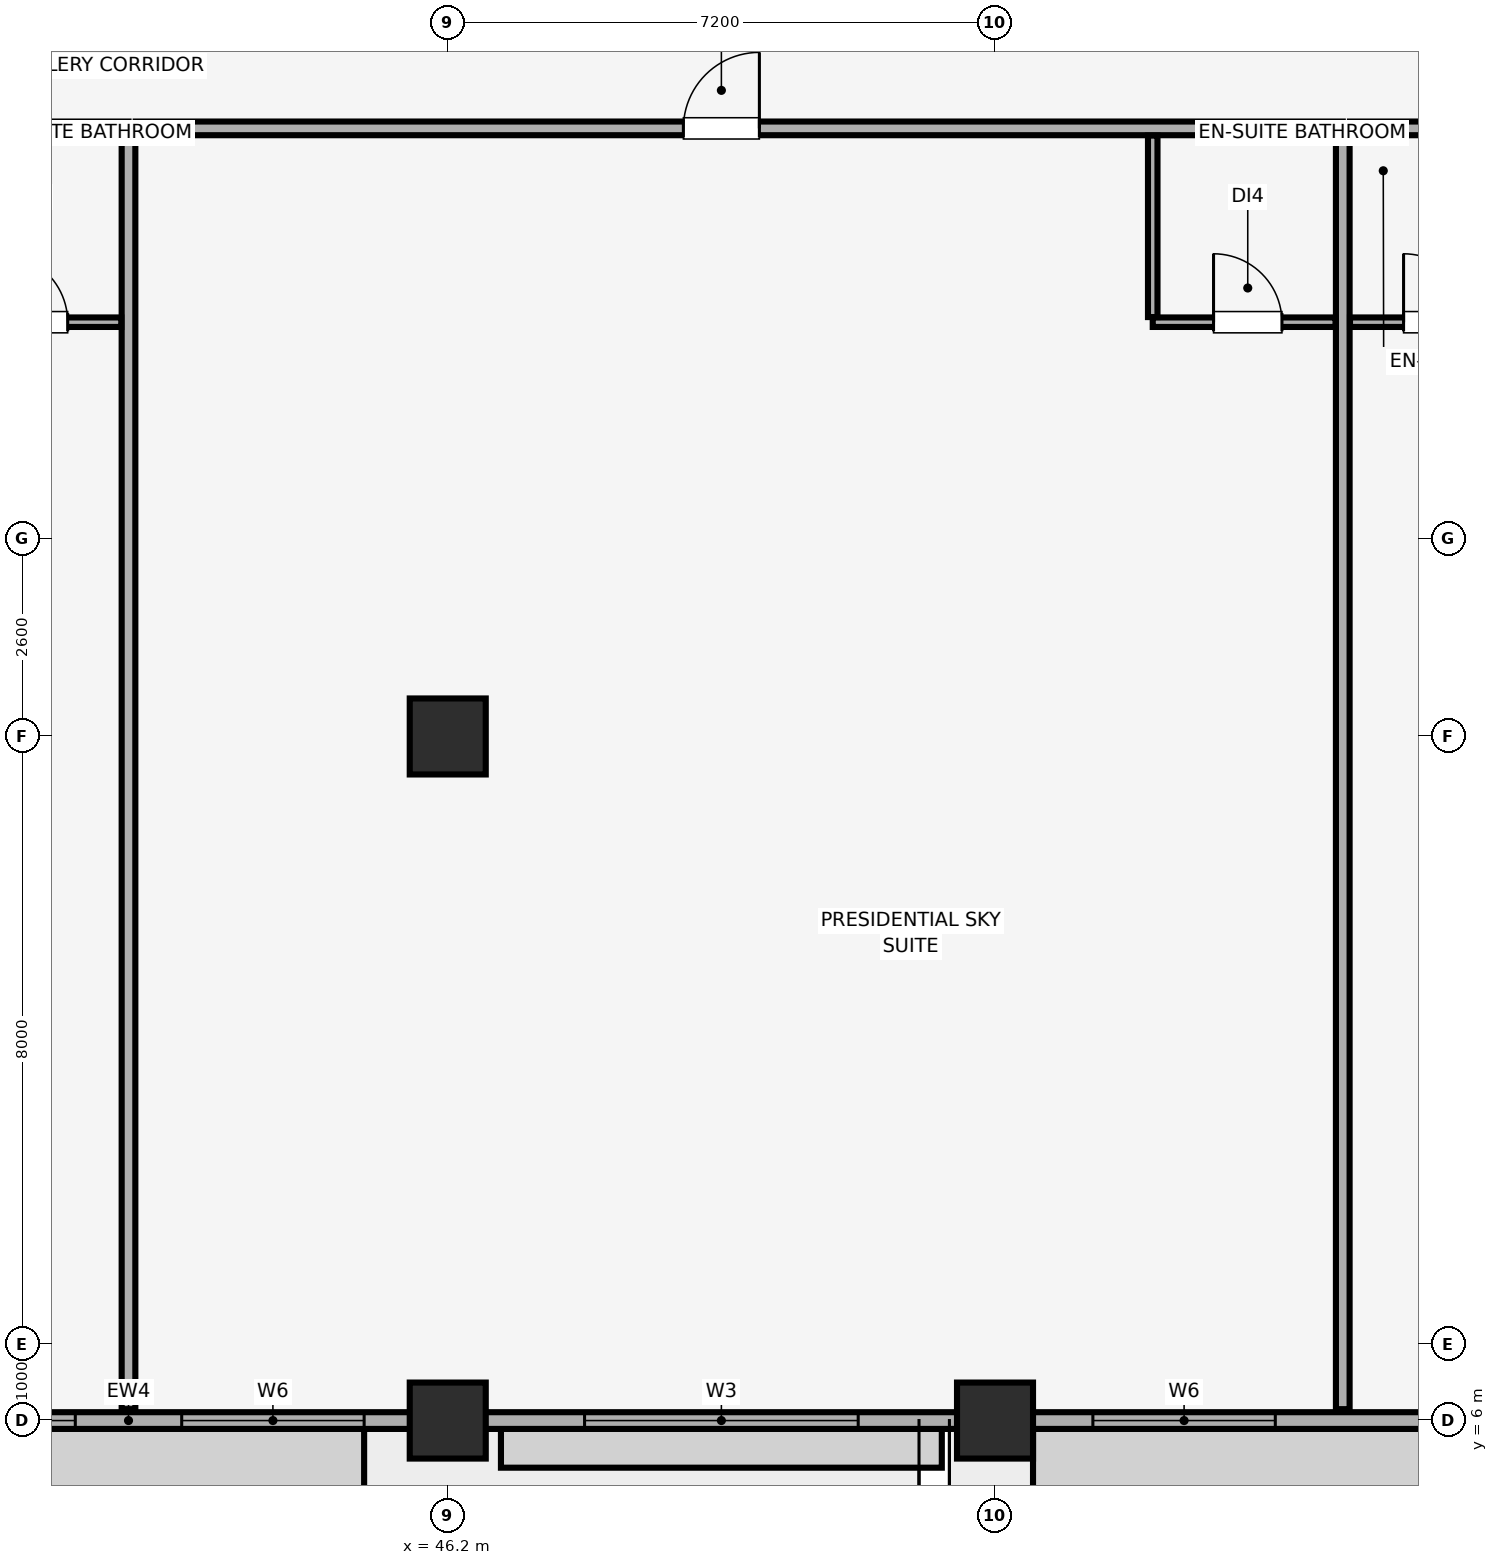
"""IFC4 building model, lengths in metres.
Left out: names, types, materials, properties, quantities, classifications, styles, units other than length and angle.
Written with IfcOpenShell. Run it as: python <this file> out.ifc"""

import sys

from ifc_helpers import new_model, si_unit, direction, frame, frame_2d, origin, origin_2d, place, context, subcontext, project, spatial, rectangle, extrude, element, fill, save


model = new_model("IFC4")
c1 = context("Model", 3, precision=1e-05, world=origin(), true_north=direction((0.0, 1.0)))
c2 = subcontext(c1, "Body", "Model", "MODEL_VIEW")
j1 = project(units=[si_unit("LENGTHUNIT", "METRE"), si_unit("PLANEANGLEUNIT", "RADIAN")], contexts=[c1])
p1 = place(None, origin())
s1 = spatial("IfcSite", under=j1, at=p1, CompositionType="ELEMENT")
p2 = place(p1, origin())
s2 = spatial("IfcBuilding", under=s1, at=p2, CompositionType="ELEMENT")
p3 = place(p2, frame((0.0, 0.0, 276.55)))
s3 = spatial("IfcBuildingStorey", under=s2, at=p3, CompositionType="ELEMENT", Elevation=276.55)
for number, where, z_axis, x_axis in (
    (1, (46.2, 6.0, 0.0), (0.0, 0.0, 1.0), (1.0, 0.0, 0.0)),
    (2, (53.4, 6.0, 0.0), (0.0, 0.0, 1.0), (1.0, 0.0, 0.0)),
    (3, (46.2, 15.0, 0.0), (0.0, 0.0, 1.0), (1.0, 0.0, 0.0)),
):
    element("IfcColumn", number, at=place(p3, frame(where, z_axis=z_axis, x_axis=x_axis)), inside=s3, PredefinedType="COLUMN", context=c2, shape_type="SweptSolid", body=[
        extrude(rectangle(XDim=1.0, YDim=1.0, at=origin_2d()), origin(), (0.0, 0.0, 1.0), 3.6),
    ])
p4 = place(p3, frame((9.8, 6.0, 0.0), z_axis=(0.0, 0.0, 1.0), x_axis=(1.0, 0.0, 0.0)))
e4 = element("IfcWall", 4, at=p4, inside=s3, PredefinedType="SOLIDWALL", context=c2, shape_type="SweptSolid", body=[
    extrude(rectangle(XDim=64.4, YDim=0.22, at=frame_2d((32.2, 0.0))), origin(), (0.0, 0.0, 1.0), 2.8),
])
p5 = place(p4, frame((10.45, 0.0, 0.0)))
e5 = element("IfcOpeningElement", 5, at=p5, cuts=e4, PredefinedType="OPENING", context=c2, shape_type="SweptSolid", body=[
    extrude(rectangle(XDim=1.1, YDim=2.15, at=frame_2d((0.55, 1.075))), frame((0.0, 0.12, 0.0), z_axis=(0.0, -1.0, 0.0), x_axis=(1.0, 0.0, 0.0)), (0.0, 0.0, 1.0), 0.24),
])
p6 = place(p4, frame((24.45, 0.0, 0.0)))
e6 = element("IfcOpeningElement", 6, at=p6, cuts=e4, PredefinedType="OPENING", context=c2, shape_type="SweptSolid", body=[
    extrude(rectangle(XDim=1.1, YDim=2.15, at=frame_2d((0.55, 1.075))), frame((0.0, 0.12, 0.0), z_axis=(0.0, -1.0, 0.0), x_axis=(1.0, 0.0, 0.0)), (0.0, 0.0, 1.0), 0.24),
])
p7 = place(p4, frame((52.85, 0.0, 0.0)))
e7 = element("IfcOpeningElement", 7, at=p7, cuts=e4, PredefinedType="OPENING", context=c2, shape_type="SweptSolid", body=[
    extrude(rectangle(XDim=1.1, YDim=2.15, at=frame_2d((0.55, 1.075))), frame((0.0, 0.12, 0.0), z_axis=(0.0, -1.0, 0.0), x_axis=(1.0, 0.0, 0.0)), (0.0, 0.0, 1.0), 0.24),
])
p8 = place(p4, frame((1.235, 0.0, 0.85)))
e8 = element("IfcOpeningElement", 8, at=p8, cuts=e4, PredefinedType="OPENING", context=c2, shape_type="SweptSolid", body=[
    extrude(rectangle(XDim=3.6, YDim=1.75, at=frame_2d((1.8, 0.875))), frame((0.0, 0.12, 0.0), z_axis=(0.0, -1.0, 0.0), x_axis=(1.0, 0.0, 0.0)), (0.0, 0.0, 1.0), 0.24),
])
p9 = place(p4, frame((7.34, 0.0, 0.85)))
e9 = element("IfcOpeningElement", 9, at=p9, cuts=e4, PredefinedType="OPENING", context=c2, shape_type="SweptSolid", body=[
    extrude(rectangle(XDim=2.4, YDim=1.5, at=frame_2d((1.2, 0.75))), frame((0.0, 0.12, 0.0), z_axis=(0.0, -1.0, 0.0), x_axis=(1.0, 0.0, 0.0)), (0.0, 0.0, 1.0), 0.24),
])
p10 = place(p4, frame((17.113, 0.0, 0.85)))
e10 = element("IfcOpeningElement", 10, at=p10, cuts=e4, PredefinedType="OPENING", context=c2, shape_type="SweptSolid", body=[
    extrude(rectangle(XDim=2.4, YDim=1.5, at=frame_2d((1.2, 0.75))), frame((0.0, 0.12, 0.0), z_axis=(0.0, -1.0, 0.0), x_axis=(1.0, 0.0, 0.0)), (0.0, 0.0, 1.0), 0.24),
])
p11 = place(p4, frame((21.99, 0.0, 0.85)))
e11 = element("IfcOpeningElement", 11, at=p11, cuts=e4, PredefinedType="OPENING", context=c2, shape_type="SweptSolid", body=[
    extrude(rectangle(XDim=1.5, YDim=1.4, at=frame_2d((0.75, 0.7))), frame((0.0, 0.12, 0.0), z_axis=(0.0, -1.0, 0.0), x_axis=(1.0, 0.0, 0.0)), (0.0, 0.0, 1.0), 0.24),
])
p12 = place(p4, frame((29.1, 0.0, 0.85)))
e12 = element("IfcOpeningElement", 12, at=p12, cuts=e4, PredefinedType="OPENING", context=c2, shape_type="SweptSolid", body=[
    extrude(rectangle(XDim=2.4, YDim=1.5, at=frame_2d((1.2, 0.75))), frame((0.0, 0.12, 0.0), z_axis=(0.0, -1.0, 0.0), x_axis=(1.0, 0.0, 0.0)), (0.0, 0.0, 1.0), 0.24),
])
p13 = place(p4, frame((32.9, 0.0, 0.85)))
e13 = element("IfcOpeningElement", 13, at=p13, cuts=e4, PredefinedType="OPENING", context=c2, shape_type="SweptSolid", body=[
    extrude(rectangle(XDim=2.4, YDim=1.5, at=frame_2d((1.2, 0.75))), frame((0.0, 0.12, 0.0), z_axis=(0.0, -1.0, 0.0), x_axis=(1.0, 0.0, 0.0)), (0.0, 0.0, 1.0), 0.24),
])
p14 = place(p4, frame((38.2, 0.0, 0.85)))
e14 = element("IfcOpeningElement", 14, at=p14, cuts=e4, PredefinedType="OPENING", context=c2, shape_type="SweptSolid", body=[
    extrude(rectangle(XDim=3.6, YDim=1.75, at=frame_2d((1.8, 0.875))), frame((0.0, 0.12, 0.0), z_axis=(0.0, -1.0, 0.0), x_axis=(1.0, 0.0, 0.0)), (0.0, 0.0, 1.0), 0.24),
])
p15 = place(p4, frame((44.887, 0.0, 0.85)))
e15 = element("IfcOpeningElement", 15, at=p15, cuts=e4, PredefinedType="OPENING", context=c2, shape_type="SweptSolid", body=[
    extrude(rectangle(XDim=2.4, YDim=1.5, at=frame_2d((1.2, 0.75))), frame((0.0, 0.12, 0.0), z_axis=(0.0, -1.0, 0.0), x_axis=(1.0, 0.0, 0.0)), (0.0, 0.0, 1.0), 0.24),
])
p16 = place(p4, frame((54.66, 0.0, 0.85)))
e16 = element("IfcOpeningElement", 16, at=p16, cuts=e4, PredefinedType="OPENING", context=c2, shape_type="SweptSolid", body=[
    extrude(rectangle(XDim=2.4, YDim=1.5, at=frame_2d((1.2, 0.75))), frame((0.0, 0.12, 0.0), z_axis=(0.0, -1.0, 0.0), x_axis=(1.0, 0.0, 0.0)), (0.0, 0.0, 1.0), 0.24),
])
p17 = place(p4, frame((59.565, 0.0, 0.85)))
e17 = element("IfcOpeningElement", 17, at=p17, cuts=e4, PredefinedType="OPENING", context=c2, shape_type="SweptSolid", body=[
    extrude(rectangle(XDim=3.6, YDim=1.75, at=frame_2d((1.8, 0.875))), frame((0.0, 0.12, 0.0), z_axis=(0.0, -1.0, 0.0), x_axis=(1.0, 0.0, 0.0)), (0.0, 0.0, 1.0), 0.24),
])
p18 = place(p3, frame((26.12, 23.0, 0.0), z_axis=(0.0, 0.0, 1.0), x_axis=(1.0, 0.0, 0.0)))
e18 = element("IfcWall", 18, at=p18, inside=s3, PredefinedType="PARTITIONING", context=c2, shape_type="SweptSolid", body=[
    extrude(rectangle(XDim=15.88, YDim=0.18, at=frame_2d((7.94, 0.0))), origin(), (0.0, 0.0, 1.0), 3.6),
])
p19 = place(p18, frame((7.58, 0.0, 0.0)))
e19 = element("IfcOpeningElement", 19, at=p19, cuts=e18, PredefinedType="OPENING", context=c2, shape_type="SweptSolid", body=[
    extrude(rectangle(XDim=1.0, YDim=2.15, at=frame_2d((0.5, 1.075))), frame((0.0, 0.1, 0.0), z_axis=(0.0, -1.0, 0.0), x_axis=(1.0, 0.0, 0.0)), (0.0, 0.0, 1.0), 0.2),
])
p20 = place(p3, frame((42.0, 6.15, 0.0), z_axis=(0.0, 0.0, 1.0), x_axis=(0.0, 1.0, 0.0)))
e20 = element("IfcWall", 20, at=p20, inside=s3, PredefinedType="PARTITIONING", context=c2, shape_type="SweptSolid", body=[
    extrude(rectangle(XDim=16.755, YDim=0.18, at=frame_2d((8.377, 0.0))), origin(), (0.0, 0.0, 1.0), 3.0),
])
p21 = place(p3, frame((39.5, 20.45, 0.0), z_axis=(0.0, 0.0, 1.0), x_axis=(1.0, 0.0, 0.0)))
e21 = element("IfcWall", 21, at=p21, inside=s3, PredefinedType="PARTITIONING", context=c2, shape_type="SweptSolid", body=[
    extrude(rectangle(XDim=2.405, YDim=0.125, at=frame_2d((1.203, 0.0))), origin(), (0.0, 0.0, 1.0), 3.6),
])
p22 = place(p21, frame((0.8, 0.0, 0.0)))
e22 = element("IfcOpeningElement", 22, at=p22, cuts=e21, PredefinedType="OPENING", context=c2, shape_type="SweptSolid", body=[
    extrude(rectangle(XDim=0.9, YDim=2.1, at=frame_2d((0.45, 1.05))), frame((0.0, 0.073, 0.0), z_axis=(0.0, -1.0, 0.0), x_axis=(1.0, 0.0, 0.0)), (0.0, 0.0, 1.0), 0.145),
])
p23 = place(p3, frame((42.095, 23.0, 0.0), z_axis=(0.0, 0.0, 1.0), x_axis=(1.0, 0.0, 0.0)))
e23 = element("IfcWall", 23, at=p23, inside=s3, PredefinedType="PARTITIONING", context=c2, shape_type="SweptSolid", body=[
    extrude(rectangle(XDim=15.88, YDim=0.18, at=frame_2d((7.94, 0.0))), origin(), (0.0, 0.0, 1.0), 3.6),
])
p24 = place(p23, frame((7.205, 0.0, 0.0)))
e24 = element("IfcOpeningElement", 24, at=p24, cuts=e23, PredefinedType="OPENING", context=c2, shape_type="SweptSolid", body=[
    extrude(rectangle(XDim=1.0, YDim=2.15, at=frame_2d((0.5, 1.075))), frame((0.0, 0.1, 0.0), z_axis=(0.0, -1.0, 0.0), x_axis=(1.0, 0.0, 0.0)), (0.0, 0.0, 1.0), 0.2),
])
p25 = place(p3, frame((57.975, 6.15, 0.0), z_axis=(0.0, 0.0, 1.0), x_axis=(0.0, 1.0, 0.0)))
e25 = element("IfcWall", 25, at=p25, inside=s3, PredefinedType="PARTITIONING", context=c2, shape_type="SweptSolid", body=[
    extrude(rectangle(XDim=16.755, YDim=0.18, at=frame_2d((8.377, 0.0))), origin(), (0.0, 0.0, 1.0), 3.6),
])
p26 = place(p3, frame((55.475, 20.45, 0.0), z_axis=(0.0, 0.0, 1.0), x_axis=(1.0, 0.0, 0.0)))
e26 = element("IfcWall", 26, at=p26, inside=s3, PredefinedType="PARTITIONING", context=c2, shape_type="SweptSolid", body=[
    extrude(rectangle(XDim=2.405, YDim=0.125, at=frame_2d((1.202, 0.0))), origin(), (0.0, 0.0, 1.0), 3.6),
])
p27 = place(p26, frame((0.8, 0.0, 0.0)))
e27 = element("IfcOpeningElement", 27, at=p27, cuts=e26, PredefinedType="OPENING", context=c2, shape_type="SweptSolid", body=[
    extrude(rectangle(XDim=0.9, YDim=2.1, at=frame_2d((0.45, 1.05))), frame((0.0, 0.073, 0.0), z_axis=(0.0, -1.0, 0.0), x_axis=(1.0, 0.0, 0.0)), (0.0, 0.0, 1.0), 0.145),
])
p28 = place(p3, frame((55.475, 20.518, 0.0), z_axis=(0.0, 0.0, 1.0), x_axis=(0.0, 1.0, 0.0)))
e28 = element("IfcWall", 28, at=p28, inside=s3, PredefinedType="PARTITIONING", context=c2, shape_type="SweptSolid", body=[
    extrude(rectangle(XDim=2.387, YDim=0.125, at=frame_2d((1.194, 0.0))), origin(), (0.0, 0.0, 1.0), 3.6),
])
p29 = place(p3, frame((58.07, 23.0, 0.0), z_axis=(0.0, 0.0, 1.0), x_axis=(1.0, 0.0, 0.0)))
e29 = element("IfcWall", 29, at=p29, inside=s3, PredefinedType="PARTITIONING", context=c2, shape_type="SweptSolid", body=[
    extrude(rectangle(XDim=19.78, YDim=0.18, at=frame_2d((9.89, 0.0))), origin(), (0.0, 0.0, 1.0), 3.6),
])
p30 = place(p29, frame((5.63, 0.0, 0.0)))
e30 = element("IfcOpeningElement", 30, at=p30, cuts=e29, PredefinedType="OPENING", context=c2, shape_type="SweptSolid", body=[
    extrude(rectangle(XDim=1.0, YDim=2.15, at=frame_2d((0.5, 1.075))), frame((0.0, 0.1, 0.0), z_axis=(0.0, -1.0, 0.0), x_axis=(1.0, 0.0, 0.0)), (0.0, 0.0, 1.0), 0.2),
])
p31 = place(p3, frame((58.07, 20.45, 0.0), z_axis=(0.0, 0.0, 1.0), x_axis=(1.0, 0.0, 0.0)))
e31 = element("IfcWall", 31, at=p31, inside=s3, PredefinedType="PARTITIONING", context=c2, shape_type="SweptSolid", body=[
    extrude(rectangle(XDim=2.405, YDim=0.125, at=frame_2d((1.203, 0.0))), origin(), (0.0, 0.0, 1.0), 3.6),
])
p32 = place(p31, frame((0.705, 0.0, 0.0)))
e32 = element("IfcOpeningElement", 32, at=p32, cuts=e31, PredefinedType="OPENING", context=c2, shape_type="SweptSolid", body=[
    extrude(rectangle(XDim=0.9, YDim=2.1, at=frame_2d((0.45, 1.05))), frame((0.0, 0.073, 0.0), z_axis=(0.0, -1.0, 0.0), x_axis=(1.0, 0.0, 0.0)), (0.0, 0.0, 1.0), 0.145),
])
p33 = place(p12, origin())
e33 = element("IfcWindow", 33, at=p33, inside=s3, PartitioningType="SINGLE_PANEL", PredefinedType="WINDOW", context=c2, shape_type="SweptSolid", body=[
    extrude(rectangle(XDim=2.4, YDim=1.5, at=frame_2d((1.2, 0.75))), frame((0.0, 0.03, 0.0), z_axis=(0.0, -1.0, 0.0), x_axis=(1.0, 0.0, 0.0)), (0.0, 0.0, 1.0), 0.06),
])
fill(e12, e33)
p34 = place(p13, origin())
e34 = element("IfcWindow", 34, at=p34, inside=s3, PartitioningType="SINGLE_PANEL", PredefinedType="WINDOW", context=c2, shape_type="SweptSolid", body=[
    extrude(rectangle(XDim=2.4, YDim=1.5, at=frame_2d((1.2, 0.75))), frame((0.0, 0.03, 0.0), z_axis=(0.0, -1.0, 0.0), x_axis=(1.0, 0.0, 0.0)), (0.0, 0.0, 1.0), 0.06),
])
fill(e13, e34)
p35 = place(p14, origin())
e35 = element("IfcWindow", 35, at=p35, inside=s3, PartitioningType="SINGLE_PANEL", PredefinedType="WINDOW", context=c2, shape_type="SweptSolid", body=[
    extrude(rectangle(XDim=3.6, YDim=1.75, at=frame_2d((1.8, 0.875))), frame((0.0, 0.03, 0.0), z_axis=(0.0, -1.0, 0.0), x_axis=(1.0, 0.0, 0.0)), (0.0, 0.0, 1.0), 0.06),
])
fill(e14, e35)
p36 = place(p15, origin())
e36 = element("IfcWindow", 36, at=p36, inside=s3, PartitioningType="SINGLE_PANEL", PredefinedType="WINDOW", context=c2, shape_type="SweptSolid", body=[
    extrude(rectangle(XDim=2.4, YDim=1.5, at=frame_2d((1.2, 0.75))), frame((0.0, 0.03, 0.0), z_axis=(0.0, -1.0, 0.0), x_axis=(1.0, 0.0, 0.0)), (0.0, 0.0, 1.0), 0.06),
])
fill(e15, e36)
p37 = place(p22, origin())
e37 = element("IfcDoor", 37, at=p37, inside=s3, OperationType="SINGLE_SWING_LEFT", PredefinedType="DOOR", context=c2, shape_type="SweptSolid", body=[
    extrude(rectangle(XDim=0.9, YDim=2.1, at=frame_2d((0.45, 1.05))), frame((0.0, 0.025, 0.0), z_axis=(0.0, -1.0, 0.0), x_axis=(1.0, 0.0, 0.0)), (0.0, 0.0, 1.0), 0.05),
])
fill(e22, e37)
p38 = place(p24, origin())
e38 = element("IfcDoor", 38, at=p38, inside=s3, OperationType="SINGLE_SWING_RIGHT", PredefinedType="DOOR", context=c2, shape_type="SweptSolid", body=[
    extrude(rectangle(XDim=1.0, YDim=2.15, at=frame_2d((0.5, 1.075))), frame((0.0, 0.025, 0.0), z_axis=(0.0, -1.0, 0.0), x_axis=(1.0, 0.0, 0.0)), (0.0, 0.0, 1.0), 0.05),
])
fill(e24, e38)
p39 = place(p27, origin())
e39 = element("IfcDoor", 39, at=p39, inside=s3, OperationType="SINGLE_SWING_LEFT", PredefinedType="DOOR", context=c2, shape_type="SweptSolid", body=[
    extrude(rectangle(XDim=0.9, YDim=2.1, at=frame_2d((0.45, 1.05))), frame((0.0, 0.025, 0.0), z_axis=(0.0, -1.0, 0.0), x_axis=(1.0, 0.0, 0.0)), (0.0, 0.0, 1.0), 0.05),
])
fill(e27, e39)
p40 = place(p32, origin())
e40 = element("IfcDoor", 40, at=p40, inside=s3, OperationType="SINGLE_SWING_LEFT", PredefinedType="DOOR", context=c2, shape_type="SweptSolid", body=[
    extrude(rectangle(XDim=0.9, YDim=2.1, at=frame_2d((0.45, 1.05))), frame((0.0, 0.025, 0.0), z_axis=(0.0, -1.0, 0.0), x_axis=(1.0, 0.0, 0.0)), (0.0, 0.0, 1.0), 0.05),
])
fill(e32, e40)
save(model, sys.argv[1])
